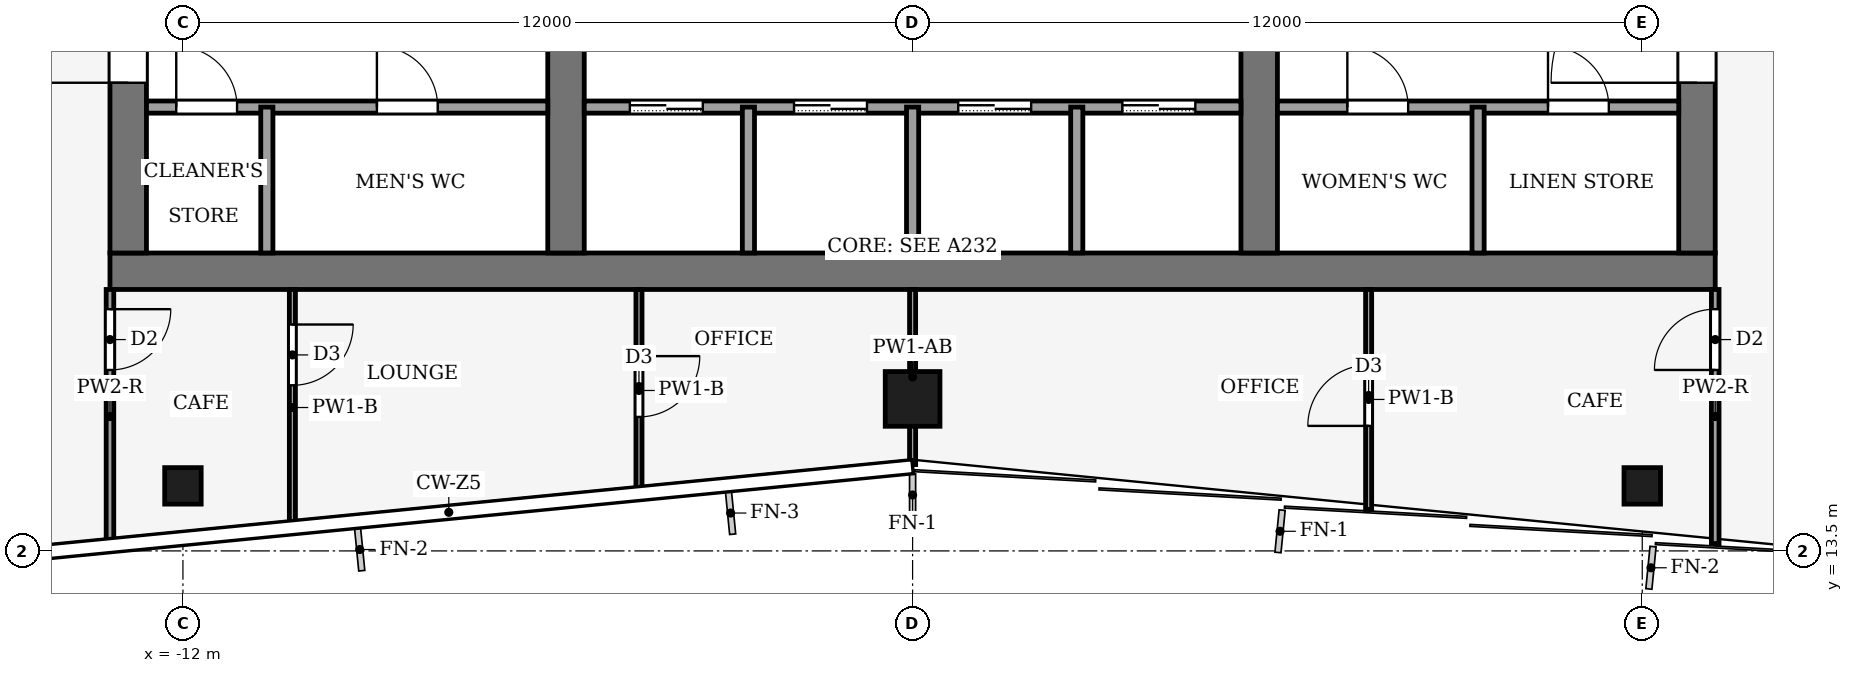
"""IFC4 building model, lengths in metres.
Left out: names, types, materials, properties, quantities, classifications, styles, units other than length and angle.
Written with IfcOpenShell. Run it as: python <this file> out.ifc"""

import sys

from ifc_helpers import new_model, si_unit, direction, frame, frame_2d, origin, origin_2d, place, context, subcontext, project, spatial, rectangle, hollow_rectangle, extrude, element, fill, save


model = new_model("IFC4")
c1 = context("Model", 3, precision=1e-05, world=origin(), true_north=direction((0.0, 1.0)))
c2 = subcontext(c1, "Body", "Model", "MODEL_VIEW")
j1 = project(units=[si_unit("LENGTHUNIT", "METRE"), si_unit("PLANEANGLEUNIT", "RADIAN")], contexts=[c1])
p1 = place(None, origin())
s1 = spatial("IfcSite", under=j1, at=p1, CompositionType="ELEMENT")
p2 = place(p1, origin())
s2 = spatial("IfcBuilding", under=s1, at=p2, CompositionType="ELEMENT")
p3 = place(p2, frame((0.0, 0.0, 289.0)))
s3 = spatial("IfcBuildingStorey", under=s2, at=p3, CompositionType="ELEMENT", Elevation=289.0)
p4 = place(p3, frame((-13.2, 18.1, -0.13), z_axis=(0.0, 0.0, 1.0), x_axis=(1.0, 0.0, 0.0)))
e1 = element("IfcWall", 1, at=p4, inside=s3, PredefinedType="SHEAR", context=c2, shape_type="SweptSolid", body=[
    extrude(rectangle(XDim=26.4, YDim=0.6, at=frame_2d((13.2, 0.0))), origin(), (0.0, 0.0, 1.0), 5.0),
])
p5 = place(p3, frame((-12.9, 18.4, -0.13), z_axis=(0.0, 0.0, 1.0), x_axis=(0.0, 1.0, 0.0)))
e2 = element("IfcWall", 2, at=p5, inside=s3, PredefinedType="SHEAR", context=c2, shape_type="SweptSolid", body=[
    extrude(rectangle(XDim=19.2, YDim=0.6, at=frame_2d((9.6, 0.0))), origin(), (0.0, 0.0, 1.0), 5.0),
])
p6 = place(p5, frame((2.8, 0.0, 0.13)))
e3 = element("IfcOpeningElement", 3, at=p6, cuts=e2, PredefinedType="OPENING", context=c2, shape_type="SweptSolid", body=[
    extrude(rectangle(XDim=2.4, YDim=2.4, at=frame_2d((1.2, 1.2))), frame((0.0, 0.31, 0.0), z_axis=(0.0, -1.0, 0.0), x_axis=(1.0, 0.0, 0.0)), (0.0, 0.0, 1.0), 0.62),
])
p7 = place(p5, frame((13.4, 0.0, 0.13)))
e4 = element("IfcOpeningElement", 4, at=p7, cuts=e2, PredefinedType="OPENING", context=c2, shape_type="SweptSolid", body=[
    extrude(rectangle(XDim=1.4, YDim=2.2, at=frame_2d((0.7, 1.1))), frame((0.0, 0.31, 0.0), z_axis=(0.0, -1.0, 0.0), x_axis=(1.0, 0.0, 0.0)), (0.0, 0.0, 1.0), 0.62),
])
p8 = place(p3, frame((12.9, 18.4, -0.13), z_axis=(0.0, 0.0, 1.0), x_axis=(0.0, 1.0, 0.0)))
e5 = element("IfcWall", 5, at=p8, inside=s3, PredefinedType="SHEAR", context=c2, shape_type="SweptSolid", body=[
    extrude(rectangle(XDim=19.2, YDim=0.6, at=frame_2d((9.6, 0.0))), origin(), (0.0, 0.0, 1.0), 5.0),
])
p9 = place(p8, frame((2.8, 0.0, 0.13)))
e6 = element("IfcOpeningElement", 6, at=p9, cuts=e5, PredefinedType="OPENING", context=c2, shape_type="SweptSolid", body=[
    extrude(rectangle(XDim=2.4, YDim=2.4, at=frame_2d((1.2, 1.2))), frame((0.0, 0.31, 0.0), z_axis=(0.0, -1.0, 0.0), x_axis=(1.0, 0.0, 0.0)), (0.0, 0.0, 1.0), 0.62),
])
p10 = place(p8, frame((13.3, 0.0, 0.13)))
e7 = element("IfcOpeningElement", 7, at=p10, cuts=e5, PredefinedType="OPENING", context=c2, shape_type="SweptSolid", body=[
    extrude(rectangle(XDim=2.4, YDim=2.4, at=frame_2d((1.2, 1.2))), frame((0.0, 0.31, 0.0), z_axis=(0.0, -1.0, 0.0), x_axis=(1.0, 0.0, 0.0)), (0.0, 0.0, 1.0), 0.62),
])
p11 = place(p3, frame((-5.7, 18.4, -0.13), z_axis=(0.0, 0.0, 1.0), x_axis=(0.0, 1.0, 0.0)))
e8 = element("IfcWall", 8, at=p11, inside=s3, PredefinedType="SHEAR", context=c2, shape_type="SweptSolid", body=[
    extrude(rectangle(XDim=19.2, YDim=0.6, at=frame_2d((9.6, 0.0))), origin(), (0.0, 0.0, 1.0), 5.0),
])
p12 = place(p11, frame((8.35, 0.0, 0.13)))
e9 = element("IfcOpeningElement", 9, at=p12, cuts=e8, PredefinedType="OPENING", context=c2, shape_type="SweptSolid", body=[
    extrude(rectangle(XDim=0.9, YDim=2.1, at=frame_2d((0.45, 1.05))), frame((0.0, 0.31, 0.0), z_axis=(0.0, -1.0, 0.0), x_axis=(1.0, 0.0, 0.0)), (0.0, 0.0, 1.0), 0.62),
])
p13 = place(p3, frame((5.7, 18.4, -0.13), z_axis=(0.0, 0.0, 1.0), x_axis=(0.0, 1.0, 0.0)))
e10 = element("IfcWall", 10, at=p13, inside=s3, PredefinedType="SHEAR", context=c2, shape_type="SweptSolid", body=[
    extrude(rectangle(XDim=19.2, YDim=0.6, at=frame_2d((9.6, 0.0))), origin(), (0.0, 0.0, 1.0), 5.0),
])
p14 = place(p13, frame((13.3, 0.0, 0.13)))
e11 = element("IfcOpeningElement", 11, at=p14, cuts=e10, PredefinedType="OPENING", context=c2, shape_type="SweptSolid", body=[
    extrude(rectangle(XDim=2.4, YDim=2.4, at=frame_2d((1.2, 1.2))), frame((0.0, 0.31, 0.0), z_axis=(0.0, -1.0, 0.0), x_axis=(1.0, 0.0, 0.0)), (0.0, 0.0, 1.0), 0.62),
])
p15 = place(p3, frame((0.0, 16.0, 0.0), z_axis=(0.0, 0.0, 1.0), x_axis=(1.0, 0.0, 0.0)))
e12 = element("IfcColumn", 12, at=p15, inside=s3, PredefinedType="COLUMN", context=c2, shape_type="SweptSolid", body=[
    extrude(hollow_rectangle(XDim=0.9, YDim=0.9, WallThickness=0.04, at=origin_2d()), origin(), (0.0, 0.0, 1.0), 5.0),
])
for number, where, z_axis, x_axis in (
    (13, (-12.0, 14.57, 0.0), (0.0, 0.0, 1.0), (1.0, 0.0, 0.0)),
    (14, (12.0, 14.57, 0.0), (0.0, 0.0, 1.0), (1.0, 0.0, 0.0)),
):
    element("IfcColumn", number, at=place(p3, frame(where, z_axis=z_axis, x_axis=x_axis)), inside=s3, PredefinedType="COLUMN", context=c2, shape_type="SweptSolid", body=[
        extrude(hollow_rectangle(XDim=0.6, YDim=0.6, WallThickness=0.025, at=origin_2d()), origin(), (0.0, 0.0, 1.0), 5.0),
    ])
p16 = place(p3, frame((-12.6, 20.8, 0.0), z_axis=(0.0, 0.0, 1.0), x_axis=(1.0, 0.0, 0.0)))
e15 = element("IfcWall", 15, at=p16, inside=s3, PredefinedType="PARTITIONING", context=c2, shape_type="SweptSolid", body=[
    extrude(rectangle(XDim=6.6, YDim=0.2, at=frame_2d((3.3, 0.0))), origin(), (0.0, 0.0, 1.0), 4.87),
])
p17 = place(p16, frame((0.49, 0.0, 0.0)))
e16 = element("IfcOpeningElement", 16, at=p17, cuts=e15, PredefinedType="OPENING", context=c2, shape_type="SweptSolid", body=[
    extrude(rectangle(XDim=1.0, YDim=2.1, at=frame_2d((0.5, 1.05))), frame((0.0, 0.11, 0.0), z_axis=(0.0, -1.0, 0.0), x_axis=(1.0, 0.0, 0.0)), (0.0, 0.0, 1.0), 0.22),
])
p18 = place(p16, frame((3.79, 0.0, 0.0)))
e17 = element("IfcOpeningElement", 17, at=p18, cuts=e15, PredefinedType="OPENING", context=c2, shape_type="SweptSolid", body=[
    extrude(rectangle(XDim=1.0, YDim=2.1, at=frame_2d((0.5, 1.05))), frame((0.0, 0.11, 0.0), z_axis=(0.0, -1.0, 0.0), x_axis=(1.0, 0.0, 0.0)), (0.0, 0.0, 1.0), 0.22),
])
p19 = place(p3, frame((-5.4, 20.8, 0.0), z_axis=(0.0, 0.0, 1.0), x_axis=(1.0, 0.0, 0.0)))
e18 = element("IfcWall", 18, at=p19, inside=s3, PredefinedType="PARTITIONING", context=c2, shape_type="SweptSolid", body=[
    extrude(rectangle(XDim=10.8, YDim=0.2, at=frame_2d((5.4, 0.0))), origin(), (0.0, 0.0, 1.0), 4.87),
])
p20 = place(p19, frame((0.75, 0.0, 0.0)))
e19 = element("IfcOpeningElement", 19, at=p20, cuts=e18, PredefinedType="OPENING", context=c2, shape_type="SweptSolid", body=[
    extrude(rectangle(XDim=1.2, YDim=2.2, at=frame_2d((0.6, 1.1))), frame((0.0, 0.11, 0.0), z_axis=(0.0, -1.0, 0.0), x_axis=(1.0, 0.0, 0.0)), (0.0, 0.0, 1.0), 0.22),
])
p21 = place(p19, frame((3.45, 0.0, 0.0)))
e20 = element("IfcOpeningElement", 20, at=p21, cuts=e18, PredefinedType="OPENING", context=c2, shape_type="SweptSolid", body=[
    extrude(rectangle(XDim=1.2, YDim=2.2, at=frame_2d((0.6, 1.1))), frame((0.0, 0.11, 0.0), z_axis=(0.0, -1.0, 0.0), x_axis=(1.0, 0.0, 0.0)), (0.0, 0.0, 1.0), 0.22),
])
p22 = place(p19, frame((6.15, 0.0, 0.0)))
e21 = element("IfcOpeningElement", 21, at=p22, cuts=e18, PredefinedType="OPENING", context=c2, shape_type="SweptSolid", body=[
    extrude(rectangle(XDim=1.2, YDim=2.2, at=frame_2d((0.6, 1.1))), frame((0.0, 0.11, 0.0), z_axis=(0.0, -1.0, 0.0), x_axis=(1.0, 0.0, 0.0)), (0.0, 0.0, 1.0), 0.22),
])
p23 = place(p19, frame((8.85, 0.0, 0.0)))
e22 = element("IfcOpeningElement", 22, at=p23, cuts=e18, PredefinedType="OPENING", context=c2, shape_type="SweptSolid", body=[
    extrude(rectangle(XDim=1.2, YDim=2.2, at=frame_2d((0.6, 1.1))), frame((0.0, 0.11, 0.0), z_axis=(0.0, -1.0, 0.0), x_axis=(1.0, 0.0, 0.0)), (0.0, 0.0, 1.0), 0.22),
])
p24 = place(p3, frame((6.0, 20.8, 0.0), z_axis=(0.0, 0.0, 1.0), x_axis=(1.0, 0.0, 0.0)))
e23 = element("IfcWall", 23, at=p24, inside=s3, PredefinedType="PARTITIONING", context=c2, shape_type="SweptSolid", body=[
    extrude(rectangle(XDim=6.6, YDim=0.2, at=frame_2d((3.3, 0.0))), origin(), (0.0, 0.0, 1.0), 4.87),
])
p25 = place(p24, frame((1.15, 0.0, 0.0)))
e24 = element("IfcOpeningElement", 24, at=p25, cuts=e23, PredefinedType="OPENING", context=c2, shape_type="SweptSolid", body=[
    extrude(rectangle(XDim=1.0, YDim=2.1, at=frame_2d((0.5, 1.05))), frame((0.0, 0.11, 0.0), z_axis=(0.0, -1.0, 0.0), x_axis=(1.0, 0.0, 0.0)), (0.0, 0.0, 1.0), 0.22),
])
p26 = place(p24, frame((4.45, 0.0, 0.0)))
e25 = element("IfcOpeningElement", 25, at=p26, cuts=e23, PredefinedType="OPENING", context=c2, shape_type="SweptSolid", body=[
    extrude(rectangle(XDim=1.0, YDim=2.1, at=frame_2d((0.5, 1.05))), frame((0.0, 0.11, 0.0), z_axis=(0.0, -1.0, 0.0), x_axis=(1.0, 0.0, 0.0)), (0.0, 0.0, 1.0), 0.22),
])
for number, where, z_axis, x_axis in (
    (26, (-10.62, 18.4, 0.0), (0.0, 0.0, 1.0), (0.0, 1.0, 0.0)),
    (27, (-2.7, 18.4, 0.0), (0.0, 0.0, 1.0), (0.0, 1.0, 0.0)),
    (28, (0.0, 18.4, 0.0), (0.0, 0.0, 1.0), (0.0, 1.0, 0.0)),
    (29, (2.7, 18.4, 0.0), (0.0, 0.0, 1.0), (0.0, 1.0, 0.0)),
    (30, (9.3, 18.4, 0.0), (0.0, 0.0, 1.0), (0.0, 1.0, 0.0)),
):
    element("IfcWall", number, at=place(p3, frame(where, z_axis=z_axis, x_axis=x_axis)), inside=s3, PredefinedType="PARTITIONING", context=c2, shape_type="SweptSolid", body=[
        extrude(rectangle(XDim=2.4, YDim=0.2, at=frame_2d((1.2, 0.0))), origin(), (0.0, 0.0, 1.0), 4.87),
    ])
p27 = place(p3, frame((-13.2, 17.8, 0.0), z_axis=(0.0, 0.0, 1.0), x_axis=(0.0, -1.0, 0.0)))
e31 = element("IfcWall", 31, at=p27, inside=s3, PredefinedType="PARTITIONING", context=c2, shape_type="SweptSolid", body=[
    extrude(rectangle(XDim=4.178, YDim=0.125, at=frame_2d((2.089, 0.0))), origin(), (0.0, 0.0, 1.0), 4.04),
])
p28 = place(p27, frame((0.324, 0.0, 0.0)))
e32 = element("IfcOpeningElement", 32, at=p28, cuts=e31, PredefinedType="OPENING", context=c2, shape_type="SweptSolid", body=[
    extrude(rectangle(XDim=1.0, YDim=2.1, at=frame_2d((0.5, 1.05))), frame((0.0, 0.073, 0.0), z_axis=(0.0, -1.0, 0.0), x_axis=(1.0, 0.0, 0.0)), (0.0, 0.0, 1.0), 0.145),
])
p29 = place(p3, frame((13.2, 13.622, 0.0), z_axis=(0.0, 0.0, 1.0), x_axis=(0.0, 1.0, 0.0)))
e33 = element("IfcWall", 33, at=p29, inside=s3, PredefinedType="PARTITIONING", context=c2, shape_type="SweptSolid", body=[
    extrude(rectangle(XDim=4.178, YDim=0.125, at=frame_2d((2.089, 0.0))), origin(), (0.0, 0.0, 1.0), 4.04),
])
p30 = place(p29, frame((2.854, 0.0, 0.0)))
e34 = element("IfcOpeningElement", 34, at=p30, cuts=e33, PredefinedType="OPENING", context=c2, shape_type="SweptSolid", body=[
    extrude(rectangle(XDim=1.0, YDim=2.1, at=frame_2d((0.5, 1.05))), frame((0.0, 0.073, 0.0), z_axis=(0.0, -1.0, 0.0), x_axis=(1.0, 0.0, 0.0)), (0.0, 0.0, 1.0), 0.145),
])
p31 = place(p3, frame((-10.2, 17.8, 0.0), z_axis=(0.0, 0.0, 1.0), x_axis=(0.0, -1.0, 0.0)))
e35 = element("IfcWall", 35, at=p31, inside=s3, PredefinedType="PARTITIONING", context=c2, shape_type="SweptSolid", body=[
    extrude(rectangle(XDim=3.883, YDim=0.1, at=frame_2d((1.942, 0.0))), origin(), (0.0, 0.0, 1.0), 4.04),
])
p32 = place(p31, frame((0.576, 0.0, 0.0)))
e36 = element("IfcOpeningElement", 36, at=p32, cuts=e35, PredefinedType="OPENING", context=c2, shape_type="SweptSolid", body=[
    extrude(rectangle(XDim=1.0, YDim=2.1, at=frame_2d((0.5, 1.05))), frame((0.0, 0.06, 0.0), z_axis=(0.0, -1.0, 0.0), x_axis=(1.0, 0.0, 0.0)), (0.0, 0.0, 1.0), 0.12),
])
p33 = place(p3, frame((-4.5, 17.8, 0.0), z_axis=(0.0, 0.0, 1.0), x_axis=(0.0, -1.0, 0.0)))
e37 = element("IfcWall", 37, at=p33, inside=s3, PredefinedType="PARTITIONING", context=c2, shape_type="SweptSolid", body=[
    extrude(rectangle(XDim=3.323, YDim=0.1, at=frame_2d((1.661, 0.0))), origin(), (0.0, 0.0, 1.0), 4.04),
])
p34 = place(p33, frame((1.096, 0.0, 0.0)))
e38 = element("IfcOpeningElement", 38, at=p34, cuts=e37, PredefinedType="OPENING", context=c2, shape_type="SweptSolid", body=[
    extrude(rectangle(XDim=1.0, YDim=2.1, at=frame_2d((0.5, 1.05))), frame((0.0, 0.06, 0.0), z_axis=(0.0, -1.0, 0.0), x_axis=(1.0, 0.0, 0.0)), (0.0, 0.0, 1.0), 0.12),
])
p35 = place(p3, frame((0.0, 14.92, 0.0), z_axis=(0.0, 0.0, 1.0), x_axis=(0.0, 1.0, 0.0)))
e39 = element("IfcWall", 39, at=p35, inside=s3, PredefinedType="PARTITIONING", context=c2, shape_type="SweptSolid", body=[
    extrude(rectangle(XDim=2.88, YDim=0.1, at=frame_2d((1.44, 0.0))), origin(), (0.0, 0.0, 1.0), 4.54),
])
p36 = place(p3, frame((7.5, 14.182, 0.0), z_axis=(0.0, 0.0, 1.0), x_axis=(0.0, 1.0, 0.0)))
e40 = element("IfcWall", 40, at=p36, inside=s3, PredefinedType="PARTITIONING", context=c2, shape_type="SweptSolid", body=[
    extrude(rectangle(XDim=3.618, YDim=0.1, at=frame_2d((1.809, 0.0))), origin(), (0.0, 0.0, 1.0), 4.04),
])
p37 = place(p36, frame((1.374, 0.0, 0.0)))
e41 = element("IfcOpeningElement", 41, at=p37, cuts=e40, PredefinedType="OPENING", context=c2, shape_type="SweptSolid", body=[
    extrude(rectangle(XDim=1.0, YDim=2.1, at=frame_2d((0.5, 1.05))), frame((0.0, 0.06, 0.0), z_axis=(0.0, -1.0, 0.0), x_axis=(1.0, 0.0, 0.0)), (0.0, 0.0, 1.0), 0.12),
])
p38 = place(p20, origin())
e42 = element("IfcDoor", 42, at=p38, inside=s3, OperationType="SLIDING_TO_LEFT", PredefinedType="DOOR", context=c2, shape_type="SweptSolid", body=[
    extrude(rectangle(XDim=1.2, YDim=2.2, at=frame_2d((0.6, 1.1))), frame((0.0, 0.025, 0.0), z_axis=(0.0, -1.0, 0.0), x_axis=(1.0, 0.0, 0.0)), (0.0, 0.0, 1.0), 0.05),
])
fill(e19, e42)
p39 = place(p21, origin())
e43 = element("IfcDoor", 43, at=p39, inside=s3, OperationType="SLIDING_TO_LEFT", PredefinedType="DOOR", context=c2, shape_type="SweptSolid", body=[
    extrude(rectangle(XDim=1.2, YDim=2.2, at=frame_2d((0.6, 1.1))), frame((0.0, 0.025, 0.0), z_axis=(0.0, -1.0, 0.0), x_axis=(1.0, 0.0, 0.0)), (0.0, 0.0, 1.0), 0.05),
])
fill(e20, e43)
p40 = place(p22, origin())
e44 = element("IfcDoor", 44, at=p40, inside=s3, OperationType="SLIDING_TO_LEFT", PredefinedType="DOOR", context=c2, shape_type="SweptSolid", body=[
    extrude(rectangle(XDim=1.2, YDim=2.2, at=frame_2d((0.6, 1.1))), frame((0.0, 0.025, 0.0), z_axis=(0.0, -1.0, 0.0), x_axis=(1.0, 0.0, 0.0)), (0.0, 0.0, 1.0), 0.05),
])
fill(e21, e44)
p41 = place(p23, origin())
e45 = element("IfcDoor", 45, at=p41, inside=s3, OperationType="SLIDING_TO_LEFT", PredefinedType="DOOR", context=c2, shape_type="SweptSolid", body=[
    extrude(rectangle(XDim=1.2, YDim=2.2, at=frame_2d((0.6, 1.1))), frame((0.0, 0.025, 0.0), z_axis=(0.0, -1.0, 0.0), x_axis=(1.0, 0.0, 0.0)), (0.0, 0.0, 1.0), 0.05),
])
fill(e22, e45)
p42 = place(p17, origin())
e46 = element("IfcDoor", 46, at=p42, inside=s3, OperationType="SINGLE_SWING_RIGHT", PredefinedType="DOOR", context=c2, shape_type="SweptSolid", body=[
    extrude(rectangle(XDim=1.0, YDim=2.1, at=frame_2d((0.5, 1.05))), frame((0.0, 0.025, 0.0), z_axis=(0.0, -1.0, 0.0), x_axis=(1.0, 0.0, 0.0)), (0.0, 0.0, 1.0), 0.05),
])
fill(e16, e46)
p43 = place(p18, origin())
e47 = element("IfcDoor", 47, at=p43, inside=s3, OperationType="SINGLE_SWING_RIGHT", PredefinedType="DOOR", context=c2, shape_type="SweptSolid", body=[
    extrude(rectangle(XDim=1.0, YDim=2.1, at=frame_2d((0.5, 1.05))), frame((0.0, 0.025, 0.0), z_axis=(0.0, -1.0, 0.0), x_axis=(1.0, 0.0, 0.0)), (0.0, 0.0, 1.0), 0.05),
])
fill(e17, e47)
p44 = place(p25, origin())
e48 = element("IfcDoor", 48, at=p44, inside=s3, OperationType="SINGLE_SWING_LEFT", PredefinedType="DOOR", context=c2, shape_type="SweptSolid", body=[
    extrude(rectangle(XDim=1.0, YDim=2.1, at=frame_2d((0.5, 1.05))), frame((0.0, 0.025, 0.0), z_axis=(0.0, -1.0, 0.0), x_axis=(1.0, 0.0, 0.0)), (0.0, 0.0, 1.0), 0.05),
])
fill(e24, e48)
p45 = place(p26, origin())
e49 = element("IfcDoor", 49, at=p45, inside=s3, OperationType="SINGLE_SWING_LEFT", PredefinedType="DOOR", context=c2, shape_type="SweptSolid", body=[
    extrude(rectangle(XDim=1.0, YDim=2.1, at=frame_2d((0.5, 1.05))), frame((0.0, 0.025, 0.0), z_axis=(0.0, -1.0, 0.0), x_axis=(1.0, 0.0, 0.0)), (0.0, 0.0, 1.0), 0.05),
])
fill(e25, e49)
p46 = place(p6, origin())
e50 = element("IfcDoor", 50, at=p46, inside=s3, OperationType="DOUBLE_DOOR_SINGLE_SWING", PredefinedType="DOOR", context=c2, shape_type="SweptSolid", body=[
    extrude(rectangle(XDim=2.4, YDim=2.4, at=frame_2d((1.2, 1.2))), frame((0.0, 0.025, 0.0), z_axis=(0.0, -1.0, 0.0), x_axis=(1.0, 0.0, 0.0)), (0.0, 0.0, 1.0), 0.05),
])
fill(e3, e50)
p47 = place(p9, origin())
e51 = element("IfcDoor", 51, at=p47, inside=s3, OperationType="DOUBLE_DOOR_SINGLE_SWING", PredefinedType="DOOR", context=c2, shape_type="SweptSolid", body=[
    extrude(rectangle(XDim=2.4, YDim=2.4, at=frame_2d((1.2, 1.2))), frame((0.0, 0.025, 0.0), z_axis=(0.0, -1.0, 0.0), x_axis=(1.0, 0.0, 0.0)), (0.0, 0.0, 1.0), 0.05),
])
fill(e6, e51)
p48 = place(p28, origin())
e52 = element("IfcDoor", 52, at=p48, inside=s3, OperationType="SINGLE_SWING_LEFT", PredefinedType="DOOR", context=c2, shape_type="SweptSolid", body=[
    extrude(rectangle(XDim=1.0, YDim=2.1, at=frame_2d((0.5, 1.05))), frame((0.0, 0.025, 0.0), z_axis=(0.0, -1.0, 0.0), x_axis=(1.0, 0.0, 0.0)), (0.0, 0.0, 1.0), 0.05),
])
fill(e32, e52)
p49 = place(p30, origin())
e53 = element("IfcDoor", 53, at=p49, inside=s3, OperationType="SINGLE_SWING_RIGHT", PredefinedType="DOOR", context=c2, shape_type="SweptSolid", body=[
    extrude(rectangle(XDim=1.0, YDim=2.1, at=frame_2d((0.5, 1.05))), frame((0.0, 0.025, 0.0), z_axis=(0.0, -1.0, 0.0), x_axis=(1.0, 0.0, 0.0)), (0.0, 0.0, 1.0), 0.05),
])
fill(e34, e53)
p50 = place(p32, origin())
e54 = element("IfcDoor", 54, at=p50, inside=s3, OperationType="SINGLE_SWING_LEFT", PredefinedType="DOOR", context=c2, shape_type="SweptSolid", body=[
    extrude(rectangle(XDim=1.0, YDim=2.1, at=frame_2d((0.5, 1.05))), frame((0.0, 0.025, 0.0), z_axis=(0.0, -1.0, 0.0), x_axis=(1.0, 0.0, 0.0)), (0.0, 0.0, 1.0), 0.05),
])
fill(e36, e54)
p51 = place(p34, origin())
e55 = element("IfcDoor", 55, at=p51, inside=s3, OperationType="SINGLE_SWING_LEFT", PredefinedType="DOOR", context=c2, shape_type="SweptSolid", body=[
    extrude(rectangle(XDim=1.0, YDim=2.1, at=frame_2d((0.5, 1.05))), frame((0.0, 0.025, 0.0), z_axis=(0.0, -1.0, 0.0), x_axis=(1.0, 0.0, 0.0)), (0.0, 0.0, 1.0), 0.05),
])
fill(e38, e55)
p52 = place(p37, origin())
e56 = element("IfcDoor", 56, at=p52, inside=s3, OperationType="SINGLE_SWING_RIGHT", PredefinedType="DOOR", context=c2, shape_type="SweptSolid", body=[
    extrude(rectangle(XDim=1.0, YDim=2.1, at=frame_2d((0.5, 1.05))), frame((0.0, 0.025, 0.0), z_axis=(0.0, -1.0, 0.0), x_axis=(1.0, 0.0, 0.0)), (0.0, 0.0, 1.0), 0.05),
])
fill(e41, e56)
save(model, sys.argv[1])
